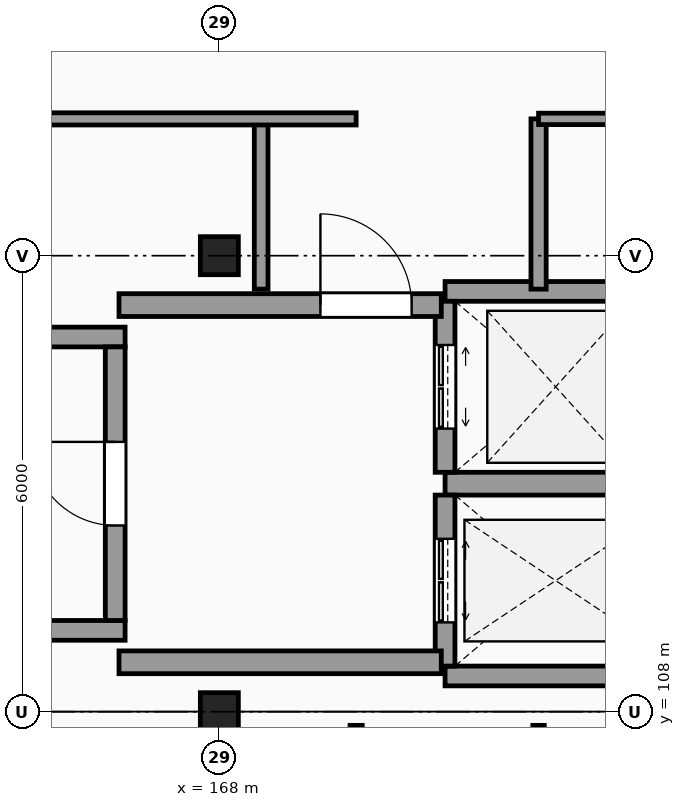
"""IFC4 building model, lengths in metres.
Left out: names, types, materials, properties, quantities, classifications, styles, units other than length and angle.
Written with IfcOpenShell. Run it as: python <this file> out.ifc"""

import sys

from ifc_helpers import new_model, si_unit, direction, frame, frame_2d, origin, origin_2d, place, context, subcontext, project, spatial, rectangle, extrude, element, fill, save


model = new_model("IFC4")
c1 = context("Model", 3, precision=1e-05, world=origin(), true_north=direction((0.0, 1.0)))
c2 = subcontext(c1, "Body", "Model", "MODEL_VIEW")
j1 = project(units=[si_unit("LENGTHUNIT", "METRE"), si_unit("PLANEANGLEUNIT", "RADIAN")], contexts=[c1])
p1 = place(None, origin())
s1 = spatial("IfcSite", under=j1, at=p1, CompositionType="ELEMENT")
p2 = place(p1, origin())
s2 = spatial("IfcBuilding", under=s1, at=p2, CompositionType="ELEMENT")
p3 = place(p2, frame((0.0, 0.0, 44.7)))
s3 = spatial("IfcBuildingStorey", under=s2, at=p3, CompositionType="ELEMENT", Elevation=44.7)
for number, where, z_axis, x_axis in (
    (1, (168.0, 108.0, 0.0), (0.0, 0.0, 1.0), (1.0, 0.0, 0.0)),
    (2, (168.0, 114.0, 0.0), (0.0, 0.0, 1.0), (1.0, 0.0, 0.0)),
):
    element("IfcColumn", number, at=place(p3, frame(where, z_axis=z_axis, x_axis=x_axis)), inside=s3, PredefinedType="COLUMN", context=c2, shape_type="SweptSolid", body=[
        extrude(rectangle(XDim=0.5, YDim=0.5, at=origin_2d()), origin(), (0.0, 0.0, 1.0), 3.3),
    ])
for number, where, z_axis, x_axis in (
    (3, (156.04, 109.07, 0.0), (0.0, 0.0, 1.0), (1.0, 0.0, 0.0)),
    (4, (156.04, 112.93, 0.0), (0.0, 0.0, 1.0), (1.0, 0.0, 0.0)),
):
    element("IfcWall", number, at=place(p3, frame(where, z_axis=z_axis, x_axis=x_axis)), inside=s3, PredefinedType="SHEAR", context=c2, shape_type="SweptSolid", body=[
        extrude(rectangle(XDim=10.72, YDim=0.26, at=frame_2d((5.36, 0.0))), origin(), (0.0, 0.0, 1.0), 3.3),
    ])
p4 = place(p3, frame((166.63, 109.2, 0.0), z_axis=(0.0, 0.0, 1.0), x_axis=(0.0, 1.0, 0.0)))
e5 = element("IfcWall", 5, at=p4, inside=s3, PredefinedType="SHEAR", context=c2, shape_type="SweptSolid", body=[
    extrude(rectangle(XDim=3.6, YDim=0.26, at=frame_2d((1.8, 0.0))), origin(), (0.0, 0.0, 1.0), 3.3),
])
p5 = place(p4, frame((1.25, 0.0, 0.0)))
e6 = element("IfcOpeningElement", 6, at=p5, cuts=e5, PredefinedType="OPENING", context=c2, shape_type="SweptSolid", body=[
    extrude(rectangle(XDim=1.1, YDim=2.15, at=frame_2d((0.55, 1.075))), frame((0.0, 0.14, 0.0), z_axis=(0.0, -1.0, 0.0), x_axis=(1.0, 0.0, 0.0)), (0.0, 0.0, 1.0), 0.28),
])
p6 = place(p3, frame((170.97, 108.47, 0.0), z_axis=(0.0, 0.0, 1.0), x_axis=(1.0, 0.0, 0.0)))
e7 = element("IfcWall", 7, at=p6, inside=s3, PredefinedType="SHEAR", context=c2, shape_type="SweptSolid", body=[
    extrude(rectangle(XDim=2.91, YDim=0.26, at=frame_2d((1.455, 0.0))), origin(), (0.0, 0.0, 1.0), 3.3),
])
p7 = place(p3, frame((170.97, 111.0, 0.0), z_axis=(0.0, 0.0, 1.0), x_axis=(1.0, 0.0, 0.0)))
e8 = element("IfcWall", 8, at=p7, inside=s3, PredefinedType="SHEAR", context=c2, shape_type="SweptSolid", body=[
    extrude(rectangle(XDim=2.91, YDim=0.3, at=frame_2d((1.455, 0.0))), origin(), (0.0, 0.0, 1.0), 3.3),
])
p8 = place(p3, frame((170.97, 108.6, 0.0), z_axis=(0.0, 0.0, 1.0), x_axis=(0.0, 1.0, 0.0)))
e9 = element("IfcWall", 9, at=p8, inside=s3, PredefinedType="SHEAR", context=c2, shape_type="SweptSolid", body=[
    extrude(rectangle(XDim=2.25, YDim=0.26, at=frame_2d((1.125, 0.0))), origin(), (0.0, 0.0, 1.0), 3.3),
])
p9 = place(p8, frame((0.575, 0.0, 0.0)))
e10 = element("IfcOpeningElement", 10, at=p9, cuts=e9, PredefinedType="OPENING", context=c2, shape_type="SweptSolid", body=[
    extrude(rectangle(XDim=1.1, YDim=2.2, at=frame_2d((0.55, 1.1))), frame((0.0, 0.14, 0.0), z_axis=(0.0, -1.0, 0.0), x_axis=(1.0, 0.0, 0.0)), (0.0, 0.0, 1.0), 0.28),
])
p10 = place(p3, frame((170.97, 113.53, 0.0), z_axis=(0.0, 0.0, 1.0), x_axis=(1.0, 0.0, 0.0)))
e11 = element("IfcWall", 11, at=p10, inside=s3, PredefinedType="SHEAR", context=c2, shape_type="SweptSolid", body=[
    extrude(rectangle(XDim=2.91, YDim=0.26, at=frame_2d((1.455, 0.0))), origin(), (0.0, 0.0, 1.0), 3.3),
])
p11 = place(p3, frame((170.97, 111.15, 0.0), z_axis=(0.0, 0.0, 1.0), x_axis=(0.0, 1.0, 0.0)))
e12 = element("IfcWall", 12, at=p11, inside=s3, PredefinedType="SHEAR", context=c2, shape_type="SweptSolid", body=[
    extrude(rectangle(XDim=2.25, YDim=0.26, at=frame_2d((1.125, 0.0))), origin(), (0.0, 0.0, 1.0), 3.3),
])
p12 = place(p11, frame((0.575, 0.0, 0.0)))
e13 = element("IfcOpeningElement", 13, at=p12, cuts=e12, PredefinedType="OPENING", context=c2, shape_type="SweptSolid", body=[
    extrude(rectangle(XDim=1.1, YDim=2.2, at=frame_2d((0.55, 1.1))), frame((0.0, 0.14, 0.0), z_axis=(0.0, -1.0, 0.0), x_axis=(1.0, 0.0, 0.0)), (0.0, 0.0, 1.0), 0.28),
])
p13 = place(p3, frame((166.68, 113.35, 0.0), z_axis=(0.0, 0.0, 1.0), x_axis=(1.0, 0.0, 0.0)))
e14 = element("IfcWall", 14, at=p13, inside=s3, PredefinedType="SHEAR", context=c2, shape_type="SweptSolid", body=[
    extrude(rectangle(XDim=4.24, YDim=0.3, at=frame_2d((2.12, 0.0))), origin(), (0.0, 0.0, 1.0), 3.3),
])
p14 = place(p13, frame((2.65, 0.0, 0.0)))
e15 = element("IfcOpeningElement", 15, at=p14, cuts=e14, PredefinedType="OPENING", context=c2, shape_type="SweptSolid", body=[
    extrude(rectangle(XDim=1.2, YDim=2.2, at=frame_2d((0.6, 1.1))), frame((0.0, 0.16, 0.0), z_axis=(0.0, -1.0, 0.0), x_axis=(1.0, 0.0, 0.0)), (0.0, 0.0, 1.0), 0.32),
])
p15 = place(p3, frame((166.68, 108.65, 0.0), z_axis=(0.0, 0.0, 1.0), x_axis=(1.0, 0.0, 0.0)))
e16 = element("IfcWall", 16, at=p15, inside=s3, PredefinedType="SHEAR", context=c2, shape_type="SweptSolid", body=[
    extrude(rectangle(XDim=4.24, YDim=0.3, at=frame_2d((2.12, 0.0))), origin(), (0.0, 0.0, 1.0), 3.3),
])
p16 = place(p3, frame((168.55, 113.56, 0.0), z_axis=(0.0, 0.0, 1.0), x_axis=(0.0, 1.0, 0.0)))
e17 = element("IfcWall", 17, at=p16, inside=s3, PredefinedType="PARTITIONING", context=c2, shape_type="SweptSolid", body=[
    extrude(rectangle(XDim=2.24, YDim=0.18, at=frame_2d((1.12, 0.0))), origin(), (0.0, 0.0, 1.0), 3.05),
])
p17 = place(p3, frame((169.8, 66.255, 0.0), z_axis=(0.0, 0.0, 1.0), x_axis=(0.0, 1.0, 0.0)))
e18 = element("IfcWall", 18, at=p17, inside=s3, PredefinedType="PARTITIONING", context=c2, shape_type="SweptSolid", body=[
    extrude(rectangle(XDim=41.565, YDim=0.16, at=frame_2d((20.783, 0.0))), origin(), (0.0, 0.0, 1.0), 3.05),
])
p18 = place(p17, frame((26.145, 0.0, 0.0)))
e19 = element("IfcOpeningElement", 19, at=p18, cuts=e18, PredefinedType="OPENING", context=c2, shape_type="SweptSolid", body=[
    extrude(rectangle(XDim=1.2, YDim=2.2, at=frame_2d((0.6, 1.1))), frame((0.0, 0.09, 0.0), z_axis=(0.0, -1.0, 0.0), x_axis=(1.0, 0.0, 0.0)), (0.0, 0.0, 1.0), 0.18),
])
p19 = place(p17, frame((8.245, 0.0, 0.0)))
e20 = element("IfcOpeningElement", 20, at=p19, cuts=e18, PredefinedType="OPENING", context=c2, shape_type="SweptSolid", body=[
    extrude(rectangle(XDim=1.0, YDim=2.15, at=frame_2d((0.5, 1.075))), frame((0.0, 0.09, 0.0), z_axis=(0.0, -1.0, 0.0), x_axis=(1.0, 0.0, 0.0)), (0.0, 0.0, 1.0), 0.18),
])
p20 = place(p17, frame((0.42, 0.0, 0.0)))
e21 = element("IfcOpeningElement", 21, at=p20, cuts=e18, PredefinedType="OPENING", context=c2, shape_type="SweptSolid", body=[
    extrude(rectangle(XDim=0.95, YDim=2.1, at=frame_2d((0.475, 1.05))), frame((0.0, 0.09, 0.0), z_axis=(0.0, -1.0, 0.0), x_axis=(1.0, 0.0, 0.0)), (0.0, 0.0, 1.0), 0.18),
])
p21 = place(p17, frame((30.47, 0.0, 0.0)))
e22 = element("IfcOpeningElement", 22, at=p21, cuts=e18, PredefinedType="OPENING", context=c2, shape_type="SweptSolid", body=[
    extrude(rectangle(XDim=0.95, YDim=2.1, at=frame_2d((0.475, 1.05))), frame((0.0, 0.09, 0.0), z_axis=(0.0, -1.0, 0.0), x_axis=(1.0, 0.0, 0.0)), (0.0, 0.0, 1.0), 0.18),
])
p22 = place(p17, frame((36.47, 0.0, 0.0)))
e23 = element("IfcOpeningElement", 23, at=p22, cuts=e18, PredefinedType="OPENING", context=c2, shape_type="SweptSolid", body=[
    extrude(rectangle(XDim=0.95, YDim=2.1, at=frame_2d((0.475, 1.05))), frame((0.0, 0.09, 0.0), z_axis=(0.0, -1.0, 0.0), x_axis=(1.0, 0.0, 0.0)), (0.0, 0.0, 1.0), 0.18),
])
p23 = place(p3, frame((172.2, 66.255, 0.0), z_axis=(0.0, 0.0, 1.0), x_axis=(0.0, 1.0, 0.0)))
e24 = element("IfcWall", 24, at=p23, inside=s3, PredefinedType="PARTITIONING", context=c2, shape_type="SweptSolid", body=[
    extrude(rectangle(XDim=41.565, YDim=0.15, at=frame_2d((20.783, 0.0))), origin(), (0.0, 0.0, 1.0), 3.05),
])
p24 = place(p23, frame((7.57, 0.0, 0.0)))
e25 = element("IfcOpeningElement", 25, at=p24, cuts=e24, PredefinedType="OPENING", context=c2, shape_type="SweptSolid", body=[
    extrude(rectangle(XDim=0.95, YDim=2.1, at=frame_2d((0.475, 1.05))), frame((0.0, 0.085, 0.0), z_axis=(0.0, -1.0, 0.0), x_axis=(1.0, 0.0, 0.0)), (0.0, 0.0, 1.0), 0.17),
])
p25 = place(p23, frame((9.37, 0.0, 0.0)))
e26 = element("IfcOpeningElement", 26, at=p25, cuts=e24, PredefinedType="OPENING", context=c2, shape_type="SweptSolid", body=[
    extrude(rectangle(XDim=0.95, YDim=2.1, at=frame_2d((0.475, 1.05))), frame((0.0, 0.085, 0.0), z_axis=(0.0, -1.0, 0.0), x_axis=(1.0, 0.0, 0.0)), (0.0, 0.0, 1.0), 0.17),
])
p26 = place(p23, frame((18.47, 0.0, 0.0)))
e27 = element("IfcOpeningElement", 27, at=p26, cuts=e24, PredefinedType="OPENING", context=c2, shape_type="SweptSolid", body=[
    extrude(rectangle(XDim=0.95, YDim=2.1, at=frame_2d((0.475, 1.05))), frame((0.0, 0.085, 0.0), z_axis=(0.0, -1.0, 0.0), x_axis=(1.0, 0.0, 0.0)), (0.0, 0.0, 1.0), 0.17),
])
p27 = place(p23, frame((22.87, 0.0, 0.0)))
e28 = element("IfcOpeningElement", 28, at=p27, cuts=e24, PredefinedType="OPENING", context=c2, shape_type="SweptSolid", body=[
    extrude(rectangle(XDim=0.95, YDim=2.1, at=frame_2d((0.475, 1.05))), frame((0.0, 0.085, 0.0), z_axis=(0.0, -1.0, 0.0), x_axis=(1.0, 0.0, 0.0)), (0.0, 0.0, 1.0), 0.17),
])
p28 = place(p23, frame((30.07, 0.0, 0.0)))
e29 = element("IfcOpeningElement", 29, at=p28, cuts=e24, PredefinedType="OPENING", context=c2, shape_type="SweptSolid", body=[
    extrude(rectangle(XDim=0.95, YDim=2.1, at=frame_2d((0.475, 1.05))), frame((0.0, 0.085, 0.0), z_axis=(0.0, -1.0, 0.0), x_axis=(1.0, 0.0, 0.0)), (0.0, 0.0, 1.0), 0.17),
])
p29 = place(p23, frame((38.32, 0.0, 0.0)))
e30 = element("IfcOpeningElement", 30, at=p29, cuts=e24, PredefinedType="OPENING", context=c2, shape_type="SweptSolid", body=[
    extrude(rectangle(XDim=0.95, YDim=2.1, at=frame_2d((0.475, 1.05))), frame((0.0, 0.085, 0.0), z_axis=(0.0, -1.0, 0.0), x_axis=(1.0, 0.0, 0.0)), (0.0, 0.0, 1.0), 0.17),
])
p30 = place(p3, frame((172.2, 113.56, 0.0), z_axis=(0.0, 0.0, 1.0), x_axis=(0.0, 1.0, 0.0)))
e31 = element("IfcWall", 31, at=p30, inside=s3, PredefinedType="PARTITIONING", context=c2, shape_type="SweptSolid", body=[
    extrude(rectangle(XDim=2.24, YDim=0.2, at=frame_2d((1.12, 0.0))), origin(), (0.0, 0.0, 1.0), 3.05),
])
p31 = place(p3, frame((102.255, 115.8, 0.0), z_axis=(0.0, 0.0, 1.0), x_axis=(1.0, 0.0, 0.0)))
e32 = element("IfcWall", 32, at=p31, inside=s3, PredefinedType="PARTITIONING", context=c2, shape_type="SweptSolid", body=[
    extrude(rectangle(XDim=67.545, YDim=0.16, at=frame_2d((33.772, 0.0))), origin(), (0.0, 0.0, 1.0), 3.05),
])
p32 = place(p31, frame((44.145, 0.0, 0.0)))
e33 = element("IfcOpeningElement", 33, at=p32, cuts=e32, PredefinedType="OPENING", context=c2, shape_type="SweptSolid", body=[
    extrude(rectangle(XDim=1.2, YDim=2.2, at=frame_2d((0.6, 1.1))), frame((0.0, 0.09, 0.0), z_axis=(0.0, -1.0, 0.0), x_axis=(1.0, 0.0, 0.0)), (0.0, 0.0, 1.0), 0.18),
])
p33 = place(p31, frame((14.145, 0.0, 0.0)))
e34 = element("IfcOpeningElement", 34, at=p33, cuts=e32, PredefinedType="OPENING", context=c2, shape_type="SweptSolid", body=[
    extrude(rectangle(XDim=1.2, YDim=2.2, at=frame_2d((0.6, 1.1))), frame((0.0, 0.09, 0.0), z_axis=(0.0, -1.0, 0.0), x_axis=(1.0, 0.0, 0.0)), (0.0, 0.0, 1.0), 0.18),
])
p34 = place(p31, frame((19.295, 0.0, 0.0)))
e35 = element("IfcOpeningElement", 35, at=p34, cuts=e32, PredefinedType="OPENING", context=c2, shape_type="SweptSolid", body=[
    extrude(rectangle(XDim=1.0, YDim=2.15, at=frame_2d((0.5, 1.075))), frame((0.0, 0.09, 0.0), z_axis=(0.0, -1.0, 0.0), x_axis=(1.0, 0.0, 0.0)), (0.0, 0.0, 1.0), 0.18),
])
p35 = place(p31, frame((26.265, 0.0, 0.0)))
e36 = element("IfcOpeningElement", 36, at=p35, cuts=e32, PredefinedType="OPENING", context=c2, shape_type="SweptSolid", body=[
    extrude(rectangle(XDim=0.96, YDim=2.15, at=frame_2d((0.48, 1.075))), frame((0.0, 0.09, 0.0), z_axis=(0.0, -1.0, 0.0), x_axis=(1.0, 0.0, 0.0)), (0.0, 0.0, 1.0), 0.18),
])
p36 = place(p31, frame((48.47, 0.0, 0.0)))
e37 = element("IfcOpeningElement", 37, at=p36, cuts=e32, PredefinedType="OPENING", context=c2, shape_type="SweptSolid", body=[
    extrude(rectangle(XDim=0.95, YDim=2.1, at=frame_2d((0.475, 1.05))), frame((0.0, 0.09, 0.0), z_axis=(0.0, -1.0, 0.0), x_axis=(1.0, 0.0, 0.0)), (0.0, 0.0, 1.0), 0.18),
])
p37 = place(p3, frame((172.2, 115.8, 0.0), z_axis=(0.0, 0.0, 1.0), x_axis=(1.0, 0.0, 0.0)))
e38 = element("IfcWall", 38, at=p37, inside=s3, PredefinedType="PARTITIONING", context=c2, shape_type="SweptSolid", body=[
    extrude(rectangle(XDim=4.3, YDim=0.15, at=frame_2d((2.15, 0.0))), origin(), (0.0, 0.0, 1.0), 3.05),
])
p38 = place(p37, frame((2.62, 0.0, 0.0)))
e39 = element("IfcOpeningElement", 39, at=p38, cuts=e38, PredefinedType="OPENING", context=c2, shape_type="SweptSolid", body=[
    extrude(rectangle(XDim=0.96, YDim=2.15, at=frame_2d((0.48, 1.075))), frame((0.0, 0.085, 0.0), z_axis=(0.0, -1.0, 0.0), x_axis=(1.0, 0.0, 0.0)), (0.0, 0.0, 1.0), 0.17),
])
p39 = place(p5, origin())
e40 = element("IfcDoor", 40, at=p39, inside=s3, OperationType="SINGLE_SWING_RIGHT", PredefinedType="DOOR", context=c2, shape_type="SweptSolid", body=[
    extrude(rectangle(XDim=1.1, YDim=2.15, at=frame_2d((0.55, 1.075))), frame((0.0, 0.025, 0.0), z_axis=(0.0, -1.0, 0.0), x_axis=(1.0, 0.0, 0.0)), (0.0, 0.0, 1.0), 0.05),
])
fill(e6, e40)
p40 = place(p9, origin())
e41 = element("IfcDoor", 41, at=p40, inside=s3, OperationType="DOUBLE_DOOR_SLIDING", PredefinedType="DOOR", context=c2, shape_type="SweptSolid", body=[
    extrude(rectangle(XDim=1.1, YDim=2.2, at=frame_2d((0.55, 1.1))), frame((0.0, 0.025, 0.0), z_axis=(0.0, -1.0, 0.0), x_axis=(1.0, 0.0, 0.0)), (0.0, 0.0, 1.0), 0.05),
])
fill(e10, e41)
p41 = place(p12, origin())
e42 = element("IfcDoor", 42, at=p41, inside=s3, OperationType="DOUBLE_DOOR_SLIDING", PredefinedType="DOOR", context=c2, shape_type="SweptSolid", body=[
    extrude(rectangle(XDim=1.1, YDim=2.2, at=frame_2d((0.55, 1.1))), frame((0.0, 0.025, 0.0), z_axis=(0.0, -1.0, 0.0), x_axis=(1.0, 0.0, 0.0)), (0.0, 0.0, 1.0), 0.05),
])
fill(e13, e42)
p42 = place(p14, origin())
e43 = element("IfcDoor", 43, at=p42, inside=s3, OperationType="SINGLE_SWING_LEFT", PredefinedType="DOOR", context=c2, shape_type="SweptSolid", body=[
    extrude(rectangle(XDim=1.2, YDim=2.2, at=frame_2d((0.6, 1.1))), frame((0.0, 0.025, 0.0), z_axis=(0.0, -1.0, 0.0), x_axis=(1.0, 0.0, 0.0)), (0.0, 0.0, 1.0), 0.05),
])
fill(e15, e43)
save(model, sys.argv[1])
